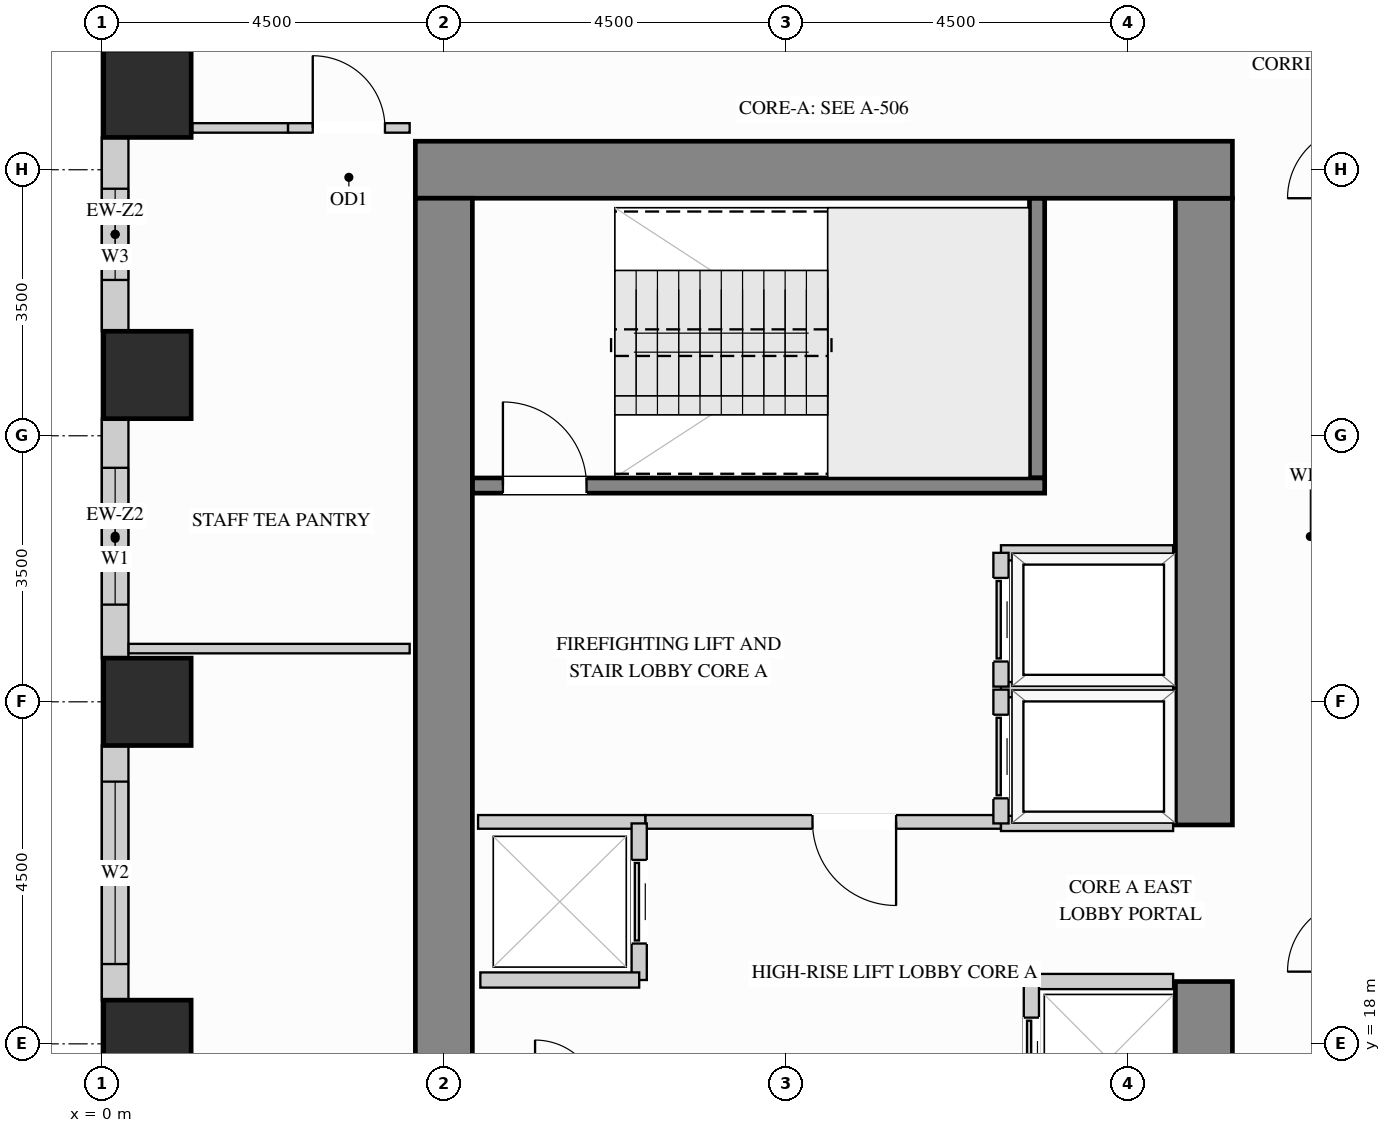
"""IFC4 building model, lengths in metres.
Left out: names, types, materials, properties, quantities, classifications, styles, units other than length and angle.
Written with IfcOpenShell. Run it as: python <this file> out.ifc"""

import sys

from ifc_helpers import new_model, si_unit, direction, frame, frame_2d, origin, origin_2d, place, context, subcontext, project, spatial, rectangle, extrude, source, transform, mapped, element, fill, save


model = new_model("IFC4")
c1 = context("Model", 3, precision=1e-05, world=origin(), true_north=direction((0.0, 1.0)))
c2 = subcontext(c1, "Body", "Model", "MODEL_VIEW")
j1 = project(units=[si_unit("LENGTHUNIT", "METRE"), si_unit("PLANEANGLEUNIT", "RADIAN")], contexts=[c1])
p1 = place(None, origin())
s1 = spatial("IfcSite", under=j1, at=p1, CompositionType="ELEMENT")
p2 = place(p1, origin())
s2 = spatial("IfcBuilding", under=s1, at=p2, CompositionType="ELEMENT")
p3 = place(p2, frame((0.0, 0.0, 84.6)))
s3 = spatial("IfcBuildingStorey", under=s2, at=p3, CompositionType="ELEMENT", Elevation=84.6)
m1 = source(origin(), c2, "Body", "SweptSolid", [
    extrude(rectangle(XDim=1.15, YDim=1.15, at=origin_2d()), origin(), (0.0, 0.0, 1.0), 3.38),
])
for number, where, z_axis, x_axis in (
    (1, (0.6, 18.0, 0.0), (0.0, 0.0, 1.0), (1.0, 0.0, 0.0)),
    (2, (0.6, 22.5, 0.0), (0.0, 0.0, 1.0), (1.0, 0.0, 0.0)),
    (3, (0.6, 26.8, 0.0), (0.0, 0.0, 1.0), (1.0, 0.0, 0.0)),
    (4, (0.6, 30.5, 0.0), (0.0, 0.0, 1.0), (1.0, 0.0, 0.0)),
):
    element("IfcColumn", number, at=place(p3, frame(where, z_axis=z_axis, x_axis=x_axis)), inside=s3, PredefinedType="COLUMN", context=c2, shape_type="MappedRepresentation", body=[
        mapped(m1, transform((0.0, 0.0, 0.0), x_axis=(1.0, 0.0, 0.0), y_axis=(0.0, 1.0, 0.0), z_axis=(0.0, 0.0, 1.0))),
    ])
m2 = source(origin(), c2, "Body", "SweptSolid", [
    extrude(rectangle(XDim=9.945, YDim=0.75, at=frame_2d((4.973, 0.0))), origin(), (0.0, 0.0, 1.0), 3.38),
])
p4 = place(p3, frame((14.5, 8.875, 0.0), z_axis=(0.0, 0.0, 1.0), x_axis=(0.0, 1.0, 0.0)))
e5 = element("IfcWall", 5, at=p4, inside=s3, PredefinedType="SHEAR", context=c2, shape_type="MappedRepresentation", body=[
    mapped(m2, transform((0.0, 0.0, 0.0), x_axis=(1.0, 0.0, 0.0), y_axis=(0.0, 1.0, 0.0), z_axis=(0.0, 0.0, 1.0))),
])
m3 = source(origin(), c2, "Body", "SweptSolid", [
    extrude(rectangle(XDim=8.245, YDim=0.75, at=frame_2d((4.123, 0.0))), origin(), (0.0, 0.0, 1.0), 3.38),
])
p5 = place(p3, frame((14.5, 20.88, 0.0), z_axis=(0.0, 0.0, 1.0), x_axis=(0.0, 1.0, 0.0)))
e6 = element("IfcWall", 6, at=p5, inside=s3, PredefinedType="SHEAR", context=c2, shape_type="MappedRepresentation", body=[
    mapped(m3, transform((0.0, 0.0, 0.0), x_axis=(1.0, 0.0, 0.0), y_axis=(0.0, 1.0, 0.0), z_axis=(0.0, 0.0, 1.0))),
])
m4 = source(origin(), c2, "Body", "SweptSolid", [
    extrude(rectangle(XDim=10.75, YDim=0.75, at=frame_2d((5.375, 0.0))), origin(), (0.0, 0.0, 1.0), 3.38),
])
p6 = place(p3, frame((4.125, 29.5, 0.0), z_axis=(0.0, 0.0, 1.0), x_axis=(1.0, 0.0, 0.0)))
e7 = element("IfcWall", 7, at=p6, inside=s3, PredefinedType="SHEAR", context=c2, shape_type="MappedRepresentation", body=[
    mapped(m4, transform((0.0, 0.0, 0.0), x_axis=(1.0, 0.0, 0.0), y_axis=(0.0, 1.0, 0.0), z_axis=(0.0, 0.0, 1.0))),
])
m5 = source(origin(), c2, "Body", "SweptSolid", [
    extrude(rectangle(XDim=20.25, YDim=0.75, at=frame_2d((10.125, 0.0))), origin(), (0.0, 0.0, 1.0), 3.38),
])
p7 = place(p3, frame((4.5, 8.875, 0.0), z_axis=(0.0, 0.0, 1.0), x_axis=(0.0, 1.0, 0.0)))
e8 = element("IfcWall", 8, at=p7, inside=s3, PredefinedType="SHEAR", context=c2, shape_type="MappedRepresentation", body=[
    mapped(m5, transform((0.0, 0.0, 0.0), x_axis=(1.0, 0.0, 0.0), y_axis=(0.0, 1.0, 0.0), z_axis=(0.0, 0.0, 1.0))),
])
p8 = place(p3, frame((0.175, 29.927, 0.0), z_axis=(0.0, 0.0, 1.0), x_axis=(0.0, -1.0, 0.0)))
e9 = element("IfcWall", 9, at=p8, inside=s3, PredefinedType="SOLIDWALL", context=c2, shape_type="SweptSolid", body=[
    extrude(rectangle(XDim=2.554, YDim=0.35, at=frame_2d((1.277, 0.0))), origin(), (0.0, 0.0, 1.0), 3.365),
])
p9 = place(p8, frame((0.677, 0.0, 0.78)))
e10 = element("IfcOpeningElement", 10, at=p9, cuts=e9, PredefinedType="OPENING", context=c2, shape_type="SweptSolid", body=[
    extrude(rectangle(XDim=1.2, YDim=2.1, at=frame_2d((0.6, 1.05))), frame((0.0, 0.185, 0.0), z_axis=(0.0, -1.0, 0.0), x_axis=(1.0, 0.0, 0.0)), (0.0, 0.0, 1.0), 0.37),
])
p10 = place(p3, frame((0.175, 26.227, 0.0), z_axis=(0.0, 0.0, 1.0), x_axis=(0.0, -1.0, 0.0)))
e11 = element("IfcWall", 11, at=p10, inside=s3, PredefinedType="SOLIDWALL", context=c2, shape_type="SweptSolid", body=[
    extrude(rectangle(XDim=3.154, YDim=0.35, at=frame_2d((1.577, 0.0))), origin(), (0.0, 0.0, 1.0), 3.365),
])
p11 = place(p10, frame((0.648, 0.0, 0.78)))
e12 = element("IfcOpeningElement", 12, at=p11, cuts=e11, PredefinedType="OPENING", context=c2, shape_type="SweptSolid", body=[
    extrude(rectangle(XDim=1.8, YDim=2.1, at=frame_2d((0.9, 1.05))), frame((0.0, 0.185, 0.0), z_axis=(0.0, -1.0, 0.0), x_axis=(1.0, 0.0, 0.0)), (0.0, 0.0, 1.0), 0.37),
])
p12 = place(p3, frame((0.175, 21.927, 0.0), z_axis=(0.0, 0.0, 1.0), x_axis=(0.0, -1.0, 0.0)))
e13 = element("IfcWall", 13, at=p12, inside=s3, PredefinedType="SOLIDWALL", context=c2, shape_type="SweptSolid", body=[
    extrude(rectangle(XDim=3.354, YDim=0.35, at=frame_2d((1.677, 0.0))), origin(), (0.0, 0.0, 1.0), 3.365),
])
p13 = place(p12, frame((0.477, 0.0, 0.78)))
e14 = element("IfcOpeningElement", 14, at=p13, cuts=e13, PredefinedType="OPENING", context=c2, shape_type="SweptSolid", body=[
    extrude(rectangle(XDim=2.4, YDim=2.1, at=frame_2d((1.2, 1.05))), frame((0.0, 0.185, 0.0), z_axis=(0.0, -1.0, 0.0), x_axis=(1.0, 0.0, 0.0)), (0.0, 0.0, 1.0), 0.37),
])
p14 = place(p3, frame((7.15, 20.92, 0.0), z_axis=(0.0, 0.0, 1.0), x_axis=(1.0, 0.0, 0.0)))
e15 = element("IfcWall", 15, at=p14, inside=s3, PredefinedType="PARTITIONING", context=c2, shape_type="SweptSolid", body=[
    extrude(rectangle(XDim=4.68, YDim=0.18, at=frame_2d((2.34, 0.0))), origin(), (0.0, 0.0, 1.0), 3.365),
])
p15 = place(p14, frame((2.2, 0.0, 0.0)))
e16 = element("IfcOpeningElement", 16, at=p15, cuts=e15, PredefinedType="OPENING", context=c2, shape_type="SweptSolid", body=[
    extrude(rectangle(XDim=1.1, YDim=2.15, at=frame_2d((0.55, 1.075))), frame((0.0, 0.1, 0.0), z_axis=(0.0, -1.0, 0.0), x_axis=(1.0, 0.0, 0.0)), (0.0, 0.0, 1.0), 0.2),
])
m6 = source(origin(), c2, "Body", "SweptSolid", [
    extrude(rectangle(XDim=2.2, YDim=0.18, at=frame_2d((1.1, 0.0))), origin(), (0.0, 0.0, 1.0), 3.365),
])
p16 = place(p3, frame((4.95, 20.92, 0.0), z_axis=(0.0, 0.0, 1.0), x_axis=(1.0, 0.0, 0.0)))
e17 = element("IfcWall", 17, at=p16, inside=s3, PredefinedType="PARTITIONING", context=c2, shape_type="MappedRepresentation", body=[
    mapped(m6, transform((0.0, 0.0, 0.0), x_axis=(1.0, 0.0, 0.0), y_axis=(0.0, 1.0, 0.0), z_axis=(0.0, 0.0, 1.0))),
])
m7 = source(origin(), c2, "Body", "SweptSolid", [
    extrude(rectangle(XDim=1.26, YDim=0.125, at=frame_2d((0.63, 0.0))), origin(), (0.0, 0.0, 1.0), 3.365),
])
p17 = place(p3, frame((1.19, 30.05, 0.0), z_axis=(0.0, 0.0, 1.0), x_axis=(1.0, 0.0, 0.0)))
e18 = element("IfcWall", 18, at=p17, inside=s3, PredefinedType="PARTITIONING", context=c2, shape_type="MappedRepresentation", body=[
    mapped(m7, transform((0.0, 0.0, 0.0), x_axis=(1.0, 0.0, 0.0), y_axis=(0.0, 1.0, 0.0), z_axis=(0.0, 0.0, 1.0))),
])
p18 = place(p3, frame((2.45, 30.05, 0.0), z_axis=(0.0, 0.0, 1.0), x_axis=(1.0, 0.0, 0.0)))
e19 = element("IfcWall", 19, at=p18, inside=s3, PredefinedType="PARTITIONING", context=c2, shape_type="SweptSolid", body=[
    extrude(rectangle(XDim=1.6, YDim=0.125, at=frame_2d((0.8, 0.0))), origin(), (0.0, 0.0, 1.0), 3.365),
])
p19 = place(p18, frame((0.325, 0.0, 0.0)))
e20 = element("IfcOpeningElement", 20, at=p19, cuts=e19, PredefinedType="OPENING", context=c2, shape_type="SweptSolid", body=[
    extrude(rectangle(XDim=0.95, YDim=2.15, at=frame_2d((0.475, 1.075))), frame((0.0, 0.073, 0.0), z_axis=(0.0, -1.0, 0.0), x_axis=(1.0, 0.0, 0.0)), (0.0, 0.0, 1.0), 0.145),
])
m8 = source(origin(), c2, "Body", "SweptSolid", [
    extrude(rectangle(XDim=3.698, YDim=0.125, at=frame_2d((1.849, 0.0))), origin(), (0.0, 0.0, 1.0), 3.365),
])
p20 = place(p3, frame((0.352, 23.2, 0.0), z_axis=(0.0, 0.0, 1.0), x_axis=(1.0, 0.0, 0.0)))
e21 = element("IfcWall", 21, at=p20, inside=s3, PredefinedType="PARTITIONING", context=c2, shape_type="MappedRepresentation", body=[
    mapped(m8, transform((0.0, 0.0, 0.0), x_axis=(1.0, 0.0, 0.0), y_axis=(0.0, 1.0, 0.0), z_axis=(0.0, 0.0, 1.0))),
])
m9 = source(origin(), c2, "Body", "SweptSolid", [
    extrude(rectangle(XDim=2.265, YDim=0.2, at=frame_2d((1.132, 0.0))), origin(), (0.0, 0.0, 1.0), 3.365),
])
for number, where, z_axis, x_axis in (
    (22, (11.83, 22.66, 0.0), (0.0, 0.0, 1.0), (1.0, 0.0, 0.0)),
    (23, (11.83, 20.9, 0.0), (0.0, 0.0, 1.0), (1.0, 0.0, 0.0)),
):
    element("IfcWall", number, at=place(p3, frame(where, z_axis=z_axis, x_axis=x_axis)), inside=s3, PredefinedType="PARTITIONING", context=c2, shape_type="MappedRepresentation", body=[
        mapped(m9, transform((0.0, 0.0, 0.0), x_axis=(1.0, 0.0, 0.0), y_axis=(0.0, 1.0, 0.0), z_axis=(0.0, 0.0, 1.0))),
    ])
p21 = place(p3, frame((11.83, 20.9, 0.0), z_axis=(0.0, 0.0, 1.0), x_axis=(0.0, 1.0, 0.0)))
e24 = element("IfcWall", 24, at=p21, inside=s3, PredefinedType="PARTITIONING", context=c2, shape_type="SweptSolid", body=[
    extrude(rectangle(XDim=1.76, YDim=0.2, at=frame_2d((0.88, 0.0))), origin(), (0.0, 0.0, 1.0), 3.365),
])
p22 = place(p21, frame((0.33, 0.0, 0.0)))
e25 = element("IfcOpeningElement", 25, at=p22, cuts=e24, PredefinedType="OPENING", context=c2, shape_type="SweptSolid", body=[
    extrude(rectangle(XDim=1.1, YDim=2.2, at=frame_2d((0.55, 1.1))), frame((0.0, 0.11, 0.0), z_axis=(0.0, -1.0, 0.0), x_axis=(1.0, 0.0, 0.0)), (0.0, 0.0, 1.0), 0.22),
])
p23 = place(p3, frame((11.83, 24.46, 0.0), z_axis=(0.0, 0.0, 1.0), x_axis=(1.0, 0.0, 0.0)))
e26 = element("IfcWall", 26, at=p23, inside=s3, PredefinedType="PARTITIONING", context=c2, shape_type="MappedRepresentation", body=[
    mapped(m9, transform((0.0, 0.0, 0.0), x_axis=(1.0, 0.0, 0.0), y_axis=(0.0, 1.0, 0.0), z_axis=(0.0, 0.0, 1.0))),
])
p24 = place(p3, frame((11.83, 22.7, 0.0), z_axis=(0.0, 0.0, 1.0), x_axis=(0.0, 1.0, 0.0)))
e27 = element("IfcWall", 27, at=p24, inside=s3, PredefinedType="PARTITIONING", context=c2, shape_type="SweptSolid", body=[
    extrude(rectangle(XDim=1.76, YDim=0.2, at=frame_2d((0.88, 0.0))), origin(), (0.0, 0.0, 1.0), 3.365),
])
p25 = place(p24, frame((0.33, 0.0, 0.0)))
e28 = element("IfcOpeningElement", 28, at=p25, cuts=e27, PredefinedType="OPENING", context=c2, shape_type="SweptSolid", body=[
    extrude(rectangle(XDim=1.1, YDim=2.2, at=frame_2d((0.55, 1.1))), frame((0.0, 0.11, 0.0), z_axis=(0.0, -1.0, 0.0), x_axis=(1.0, 0.0, 0.0)), (0.0, 0.0, 1.0), 0.22),
])
m10 = source(origin(), c2, "Body", "SweptSolid", [
    extrude(rectangle(XDim=1.865, YDim=0.2, at=frame_2d((0.933, 0.0))), origin(), (0.0, 0.0, 1.0), 3.365),
])
p26 = place(p3, frame((12.23, 18.82, 0.0), z_axis=(0.0, 0.0, 1.0), x_axis=(1.0, 0.0, 0.0)))
e29 = element("IfcWall", 29, at=p26, inside=s3, PredefinedType="PARTITIONING", context=c2, shape_type="MappedRepresentation", body=[
    mapped(m10, transform((0.0, 0.0, 0.0), x_axis=(1.0, 0.0, 0.0), y_axis=(0.0, 1.0, 0.0), z_axis=(0.0, 0.0, 1.0))),
])
p27 = place(p3, frame((12.23, 16.77, 0.0), z_axis=(0.0, 0.0, 1.0), x_axis=(0.0, 1.0, 0.0)))
e30 = element("IfcWall", 30, at=p27, inside=s3, PredefinedType="PARTITIONING", context=c2, shape_type="SweptSolid", body=[
    extrude(rectangle(XDim=2.05, YDim=0.2, at=frame_2d((1.025, 0.0))), origin(), (0.0, 0.0, 1.0), 3.365),
])
p28 = place(p27, frame((0.475, 0.0, 0.0)))
e31 = element("IfcOpeningElement", 31, at=p28, cuts=e30, PredefinedType="OPENING", context=c2, shape_type="SweptSolid", body=[
    extrude(rectangle(XDim=1.1, YDim=2.2, at=frame_2d((0.55, 1.1))), frame((0.0, 0.11, 0.0), z_axis=(0.0, -1.0, 0.0), x_axis=(1.0, 0.0, 0.0)), (0.0, 0.0, 1.0), 0.22),
])
p29 = place(p3, frame((7.07, 18.84, 0.0), z_axis=(0.0, 0.0, 1.0), x_axis=(0.0, 1.0, 0.0)))
e32 = element("IfcWall", 32, at=p29, inside=s3, PredefinedType="PARTITIONING", context=c2, shape_type="SweptSolid", body=[
    extrude(rectangle(XDim=2.06, YDim=0.2, at=frame_2d((1.03, 0.0))), origin(), (0.0, 0.0, 1.0), 3.365),
])
p30 = place(p29, frame((0.48, 0.0, 0.0)))
e33 = element("IfcOpeningElement", 33, at=p30, cuts=e32, PredefinedType="OPENING", context=c2, shape_type="SweptSolid", body=[
    extrude(rectangle(XDim=1.1, YDim=2.2, at=frame_2d((0.55, 1.1))), frame((0.0, 0.11, 0.0), z_axis=(0.0, -1.0, 0.0), x_axis=(1.0, 0.0, 0.0)), (0.0, 0.0, 1.0), 0.22),
])
m11 = source(origin(), c2, "Body", "SweptSolid", [
    extrude(rectangle(XDim=2.09, YDim=0.2, at=frame_2d((1.045, 0.0))), origin(), (0.0, 0.0, 1.0), 3.365),
])
p31 = place(p3, frame((4.98, 18.84, 0.0), z_axis=(0.0, 0.0, 1.0), x_axis=(1.0, 0.0, 0.0)))
e34 = element("IfcWall", 34, at=p31, inside=s3, PredefinedType="PARTITIONING", context=c2, shape_type="MappedRepresentation", body=[
    mapped(m11, transform((0.0, 0.0, 0.0), x_axis=(1.0, 0.0, 0.0), y_axis=(0.0, 1.0, 0.0), z_axis=(0.0, 0.0, 1.0))),
])
m12 = source(origin(), c2, "Body", "SweptSolid", [
    extrude(rectangle(XDim=3.678, YDim=0.2, at=frame_2d((1.839, 0.0))), origin(), (0.0, 0.0, 1.0), 3.38),
])
p32 = place(p3, frame((12.305, 25.445, 0.0), z_axis=(0.0, 0.0, 1.0), x_axis=(0.0, 1.0, 0.0)))
e35 = element("IfcWall", 35, at=p32, inside=s3, PredefinedType="SHEAR", context=c2, shape_type="MappedRepresentation", body=[
    mapped(m12, transform((0.0, 0.0, 0.0), x_axis=(1.0, 0.0, 0.0), y_axis=(0.0, 1.0, 0.0), z_axis=(0.0, 0.0, 1.0))),
])
p33 = place(p3, frame((4.877, 25.345, 0.0), z_axis=(0.0, 0.0, 1.0), x_axis=(1.0, 0.0, 0.0)))
e36 = element("IfcWall", 36, at=p33, inside=s3, PredefinedType="SHEAR", context=c2, shape_type="SweptSolid", body=[
    extrude(rectangle(XDim=7.528, YDim=0.2, at=frame_2d((3.764, 0.0))), origin(), (0.0, 0.0, 1.0), 3.38),
])
p34 = place(p33, frame((0.4, 0.0, 0.0)))
e37 = element("IfcOpeningElement", 37, at=p34, cuts=e36, PredefinedType="OPENING", context=c2, shape_type="SweptSolid", body=[
    extrude(rectangle(XDim=1.1, YDim=2.15, at=frame_2d((0.55, 1.075))), frame((0.0, 0.11, 0.0), z_axis=(0.0, -1.0, 0.0), x_axis=(1.0, 0.0, 0.0)), (0.0, 0.0, 1.0), 0.22),
])
m13 = source(origin(), c2, "Body", "SweptSolid", [
    extrude(rectangle(XDim=1.1, YDim=2.15, at=frame_2d((0.55, 1.075))), frame((0.0, 0.025, 0.0), z_axis=(0.0, -1.0, 0.0), x_axis=(1.0, 0.0, 0.0)), (0.0, 0.0, 1.0), 0.05),
])
p35 = place(p15, origin())
e38 = element("IfcDoor", 38, at=p35, inside=s3, OperationType="SINGLE_SWING_RIGHT", PredefinedType="DOOR", context=c2, shape_type="MappedRepresentation", body=[
    mapped(m13, transform((0.0, 0.0, 0.0), x_axis=(1.0, 0.0, 0.0), y_axis=(0.0, 1.0, 0.0), z_axis=(0.0, 0.0, 1.0))),
])
fill(e16, e38)
m14 = source(origin(), c2, "Body", "SweptSolid", [
    extrude(rectangle(XDim=1.1, YDim=2.2, at=frame_2d((0.55, 1.1))), frame((0.0, 0.025, 0.0), z_axis=(0.0, -1.0, 0.0), x_axis=(1.0, 0.0, 0.0)), (0.0, 0.0, 1.0), 0.05),
])
p36 = place(p22, origin())
e39 = element("IfcDoor", 39, at=p36, inside=s3, OperationType="SLIDING_TO_LEFT", PredefinedType="DOOR", context=c2, shape_type="MappedRepresentation", body=[
    mapped(m14, transform((0.0, 0.0, 0.0), x_axis=(1.0, 0.0, 0.0), y_axis=(0.0, 1.0, 0.0), z_axis=(0.0, 0.0, 1.0))),
])
fill(e25, e39)
p37 = place(p25, origin())
e40 = element("IfcDoor", 40, at=p37, inside=s3, OperationType="SLIDING_TO_LEFT", PredefinedType="DOOR", context=c2, shape_type="MappedRepresentation", body=[
    mapped(m14, transform((0.0, 0.0, 0.0), x_axis=(1.0, 0.0, 0.0), y_axis=(0.0, 1.0, 0.0), z_axis=(0.0, 0.0, 1.0))),
])
fill(e28, e40)
p38 = place(p28, origin())
e41 = element("IfcDoor", 41, at=p38, inside=s3, OperationType="SLIDING_TO_LEFT", PredefinedType="DOOR", context=c2, shape_type="MappedRepresentation", body=[
    mapped(m14, transform((0.0, 0.0, 0.0), x_axis=(1.0, 0.0, 0.0), y_axis=(0.0, 1.0, 0.0), z_axis=(0.0, 0.0, 1.0))),
])
fill(e31, e41)
p39 = place(p30, origin())
e42 = element("IfcDoor", 42, at=p39, inside=s3, OperationType="SLIDING_TO_LEFT", PredefinedType="DOOR", context=c2, shape_type="MappedRepresentation", body=[
    mapped(m14, transform((0.0, 0.0, 0.0), x_axis=(1.0, 0.0, 0.0), y_axis=(0.0, 1.0, 0.0), z_axis=(0.0, 0.0, 1.0))),
])
fill(e33, e42)
m15 = source(origin(), c2, "Body", "SweptSolid", [
    extrude(rectangle(XDim=0.95, YDim=2.15, at=frame_2d((0.475, 1.075))), frame((0.0, 0.025, 0.0), z_axis=(0.0, -1.0, 0.0), x_axis=(1.0, 0.0, 0.0)), (0.0, 0.0, 1.0), 0.05),
])
p40 = place(p19, origin())
e43 = element("IfcDoor", 43, at=p40, inside=s3, OperationType="SINGLE_SWING_LEFT", PredefinedType="DOOR", context=c2, shape_type="MappedRepresentation", body=[
    mapped(m15, transform((0.0, 0.0, 0.0), x_axis=(1.0, 0.0, 0.0), y_axis=(0.0, 1.0, 0.0), z_axis=(0.0, 0.0, 1.0))),
])
fill(e20, e43)
m16 = source(origin(), c2, "Body", "SweptSolid", [
    extrude(rectangle(XDim=1.1, YDim=2.15, at=frame_2d((0.55, 1.075))), frame((0.0, 0.025, 0.0), z_axis=(0.0, -1.0, 0.0), x_axis=(1.0, 0.0, 0.0)), (0.0, 0.0, 1.0), 0.05),
])
p41 = place(p34, origin())
e44 = element("IfcDoor", 44, at=p41, inside=s3, OperationType="SINGLE_SWING_LEFT", PredefinedType="DOOR", context=c2, shape_type="MappedRepresentation", body=[
    mapped(m16, transform((0.0, 0.0, 0.0), x_axis=(1.0, 0.0, 0.0), y_axis=(0.0, 1.0, 0.0), z_axis=(0.0, 0.0, 1.0))),
])
fill(e37, e44)
m17 = source(origin(), c2, "Body", "SweptSolid", [
    extrude(rectangle(XDim=1.8, YDim=2.1, at=frame_2d((0.9, 1.05))), frame((0.0, 0.03, 0.0), z_axis=(0.0, -1.0, 0.0), x_axis=(1.0, 0.0, 0.0)), (0.0, 0.0, 1.0), 0.06),
])
p42 = place(p11, origin())
e45 = element("IfcWindow", 45, at=p42, inside=s3, PartitioningType="SINGLE_PANEL", PredefinedType="WINDOW", context=c2, shape_type="MappedRepresentation", body=[
    mapped(m17, transform((0.0, 0.0, 0.0), x_axis=(1.0, 0.0, 0.0), y_axis=(0.0, 1.0, 0.0), z_axis=(0.0, 0.0, 1.0))),
])
fill(e12, e45)
m18 = source(origin(), c2, "Body", "SweptSolid", [
    extrude(rectangle(XDim=2.4, YDim=2.1, at=frame_2d((1.2, 1.05))), frame((0.0, 0.03, 0.0), z_axis=(0.0, -1.0, 0.0), x_axis=(1.0, 0.0, 0.0)), (0.0, 0.0, 1.0), 0.06),
])
p43 = place(p13, origin())
e46 = element("IfcWindow", 46, at=p43, inside=s3, PartitioningType="SINGLE_PANEL", PredefinedType="WINDOW", context=c2, shape_type="MappedRepresentation", body=[
    mapped(m18, transform((0.0, 0.0, 0.0), x_axis=(1.0, 0.0, 0.0), y_axis=(0.0, 1.0, 0.0), z_axis=(0.0, 0.0, 1.0))),
])
fill(e14, e46)
m19 = source(origin(), c2, "Body", "SweptSolid", [
    extrude(rectangle(XDim=1.2, YDim=2.1, at=frame_2d((0.6, 1.05))), frame((0.0, 0.03, 0.0), z_axis=(0.0, -1.0, 0.0), x_axis=(1.0, 0.0, 0.0)), (0.0, 0.0, 1.0), 0.06),
])
p44 = place(p9, origin())
e47 = element("IfcWindow", 47, at=p44, inside=s3, PartitioningType="SINGLE_PANEL", PredefinedType="WINDOW", context=c2, shape_type="MappedRepresentation", body=[
    mapped(m19, transform((0.0, 0.0, 0.0), x_axis=(1.0, 0.0, 0.0), y_axis=(0.0, 1.0, 0.0), z_axis=(0.0, 0.0, 1.0))),
])
fill(e10, e47)
save(model, sys.argv[1])
